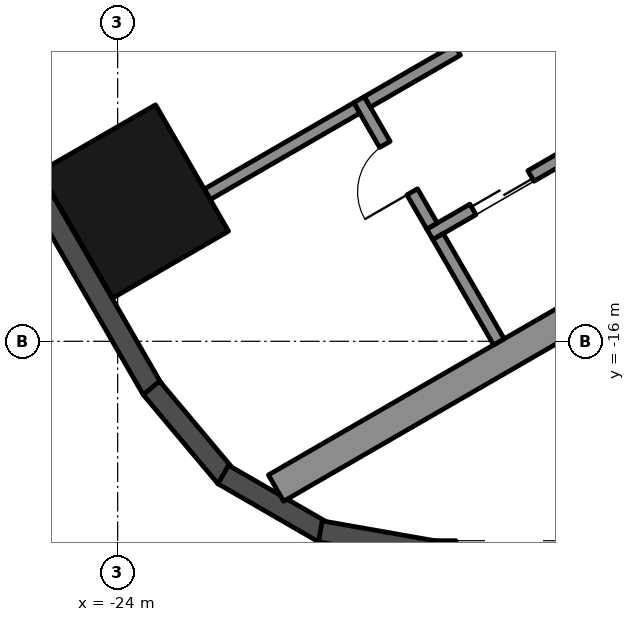
"""IFC4 building model, lengths in metres.
Left out: names, types, materials, properties, quantities, classifications, styles, units other than length and angle.
Written with IfcOpenShell. Run it as: python <this file> out.ifc"""

import sys

from ifc_helpers import new_model, si_unit, direction, frame, frame_2d, origin, origin_2d, place, context, subcontext, project, spatial, rectangle, hollow_rectangle, extrude, element, fill, save


model = new_model("IFC4")
c1 = context("Model", 3, precision=1e-05, world=origin(), true_north=direction((0.0, 1.0)))
c2 = subcontext(c1, "Body", "Model", "MODEL_VIEW")
j1 = project(units=[si_unit("LENGTHUNIT", "METRE"), si_unit("PLANEANGLEUNIT", "RADIAN")], contexts=[c1])
p1 = place(None, origin())
s1 = spatial("IfcSite", under=j1, at=p1, CompositionType="ELEMENT")
p2 = place(p1, origin())
s2 = spatial("IfcBuilding", under=s1, at=p2, CompositionType="ELEMENT")
p3 = place(p2, frame((0.0, 0.0, 191.0)))
s3 = spatial("IfcBuildingStorey", under=s2, at=p3, CompositionType="ELEMENT", Elevation=191.0)
p4 = place(p3, frame((-23.729, -13.7, 0.0), z_axis=(0.0, 0.0, 1.0), x_axis=(-0.5, 0.866025403784, 0.0)))
e1 = element("IfcColumn", 1, at=p4, inside=s3, PredefinedType="COLUMN", context=c2, shape_type="SweptSolid", body=[
    extrude(hollow_rectangle(XDim=2.4, YDim=2.2, WallThickness=0.06, at=origin_2d()), origin(), (0.0, 0.0, 1.0), 3.7),
])
p5 = place(p3, frame((-26.257, -11.893, 0.0), z_axis=(0.0, 0.0, 1.0), x_axis=(0.500018773155, -0.866014564827, 0.0)))
e2 = element("IfcWall", 2, at=p5, inside=s3, PredefinedType="SOLIDWALL", context=c2, shape_type="SweptSolid", body=[
    extrude(rectangle(XDim=5.658, YDim=0.35, at=frame_2d((2.829, 0.0))), origin(), (0.0, 0.0, 1.0), 3.55),
])
for number, where, z_axis, x_axis in (
    (3, (-23.445, -16.768, 0.0), (0.0, 0.0, 1.0), (0.643, -0.766, 0.0)),
    (4, (-22.264, -18.192, 0.0), (0.0, 0.0, 1.0), (0.866, -0.5, 0.0)),
):
    element("IfcWall", number, at=place(p3, frame(where, z_axis=z_axis, x_axis=x_axis)), inside=s3, PredefinedType="SOLIDWALL", context=c2, shape_type="SweptSolid", body=[
        extrude(rectangle(XDim=1.91, YDim=0.35, at=frame_2d((0.955, 0.0))), origin(), (0.0, 0.0, 1.0), 3.55),
    ])
p6 = place(p3, frame((-20.667, -19.126, 0.0), z_axis=(0.0, 0.0, 1.0), x_axis=(0.984798995425, -0.173697837091, 0.0)))
e5 = element("IfcWall", 5, at=p6, inside=s3, PredefinedType="SOLIDWALL", context=c2, shape_type="SweptSolid", body=[
    extrude(rectangle(XDim=1.91, YDim=0.35, at=frame_2d((0.955, 0.0))), origin(), (0.0, 0.0, 1.0), 3.55),
])
p7 = place(p3, frame((-18.816, -19.455, 0.0), z_axis=(0.0, 0.0, 1.0), x_axis=(1.0, 0.0, 0.0)))
e6 = element("IfcWall", 6, at=p7, inside=s3, PredefinedType="SOLIDWALL", context=c2, shape_type="SweptSolid", body=[
    extrude(rectangle(XDim=11.816, YDim=0.35, at=frame_2d((5.908, 0.0))), origin(), (0.0, 0.0, 1.0), 3.55),
])
p8 = place(p7, frame((0.381, 0.0, 0.3)))
e7 = element("IfcOpeningElement", 7, at=p8, cuts=e6, PredefinedType="OPENING", context=c2, shape_type="SweptSolid", body=[
    extrude(rectangle(XDim=1.9, YDim=2.65, at=frame_2d((0.95, 1.325))), frame((0.0, 0.185, 0.0), z_axis=(0.0, -1.0, 0.0), x_axis=(1.0, 0.0, 0.0)), (0.0, 0.0, 1.0), 0.37),
])
p9 = place(p7, frame((7.79, 0.0, 0.0)))
e8 = element("IfcOpeningElement", 8, at=p9, cuts=e6, PredefinedType="OPENING", context=c2, shape_type="SweptSolid", body=[
    extrude(rectangle(XDim=2.4, YDim=2.4, at=frame_2d((1.2, 1.2))), frame((0.0, 0.185, 0.0), z_axis=(0.0, -1.0, 0.0), x_axis=(1.0, 0.0, 0.0)), (0.0, 0.0, 1.0), 0.37),
])
p10 = place(p7, frame((3.741, 0.0, 0.3)))
e9 = element("IfcOpeningElement", 9, at=p10, cuts=e6, PredefinedType="OPENING", context=c2, shape_type="SweptSolid", body=[
    extrude(rectangle(XDim=1.7, YDim=2.65, at=frame_2d((0.85, 1.325))), frame((0.0, 0.185, 0.0), z_axis=(0.0, -1.0, 0.0), x_axis=(1.0, 0.0, 0.0)), (0.0, 0.0, 1.0), 0.37),
])
p11 = place(p7, frame((5.741, 0.0, 0.3)))
e10 = element("IfcOpeningElement", 10, at=p11, cuts=e6, PredefinedType="OPENING", context=c2, shape_type="SweptSolid", body=[
    extrude(rectangle(XDim=1.7, YDim=2.65, at=frame_2d((0.85, 1.325))), frame((0.0, 0.185, 0.0), z_axis=(0.0, -1.0, 0.0), x_axis=(1.0, 0.0, 0.0)), (0.0, 0.0, 1.0), 0.37),
])
p12 = place(p3, frame((-8.547, -10.997, 0.0), z_axis=(0.0, 0.0, 1.0), x_axis=(-0.866025009528, -0.500000682871, 0.0)))
e11 = element("IfcWall", 11, at=p12, inside=s3, PredefinedType="SHEAR", context=c2, shape_type="SweptSolid", body=[
    extrude(rectangle(XDim=14.837, YDim=0.5, at=frame_2d((7.418, 0.0))), origin(), (0.0, 0.0, 1.0), 3.5),
])
p13 = place(p3, frame((-10.068, -9.162, 0.0), z_axis=(0.0, 0.0, 1.0), x_axis=(-0.866032725843, -0.499987317609, 0.0)))
e12 = element("IfcWall", 12, at=p13, inside=s3, PredefinedType="SHEAR", context=c2, shape_type="SweptSolid", body=[
    extrude(rectangle(XDim=10.16, YDim=0.2, at=frame_2d((5.08, 0.0))), origin(), (0.0, 0.0, 1.0), 3.5),
])
p14 = place(p13, frame((0.62, 0.0, 0.0)))
e13 = element("IfcOpeningElement", 13, at=p14, cuts=e12, PredefinedType="OPENING", context=c2, shape_type="SweptSolid", body=[
    extrude(rectangle(XDim=1.1, YDim=2.1, at=frame_2d((0.55, 1.05))), frame((0.0, 0.11, 0.0), z_axis=(0.0, -1.0, 0.0), x_axis=(1.0, 0.0, 0.0)), (0.0, 0.0, 1.0), 0.22),
])
p15 = place(p13, frame((3.16, 0.0, 0.0)))
e14 = element("IfcOpeningElement", 14, at=p15, cuts=e12, PredefinedType="OPENING", context=c2, shape_type="SweptSolid", body=[
    extrude(rectangle(XDim=1.1, YDim=2.1, at=frame_2d((0.55, 1.05))), frame((0.0, 0.11, 0.0), z_axis=(0.0, -1.0, 0.0), x_axis=(1.0, 0.0, 0.0)), (0.0, 0.0, 1.0), 0.22),
])
p16 = place(p13, frame((5.7, 0.0, 0.0)))
e15 = element("IfcOpeningElement", 15, at=p16, cuts=e12, PredefinedType="OPENING", context=c2, shape_type="SweptSolid", body=[
    extrude(rectangle(XDim=1.1, YDim=2.1, at=frame_2d((0.55, 1.05))), frame((0.0, 0.11, 0.0), z_axis=(0.0, -1.0, 0.0), x_axis=(1.0, 0.0, 0.0)), (0.0, 0.0, 1.0), 0.22),
])
p17 = place(p13, frame((8.24, 0.0, 0.0)))
e16 = element("IfcOpeningElement", 16, at=p17, cuts=e12, PredefinedType="OPENING", context=c2, shape_type="SweptSolid", body=[
    extrude(rectangle(XDim=1.1, YDim=2.1, at=frame_2d((0.55, 1.05))), frame((0.0, 0.11, 0.0), z_axis=(0.0, -1.0, 0.0), x_axis=(1.0, 0.0, 0.0)), (0.0, 0.0, 1.0), 0.22),
])
p18 = place(p3, frame((-20.031, -12.026, 0.0), z_axis=(0.0, 0.0, 1.0), x_axis=(0.500033551112, -0.866006032174, 0.0)))
e17 = element("IfcWall", 17, at=p18, inside=s3, PredefinedType="SHEAR", context=c2, shape_type="SweptSolid", body=[
    extrude(rectangle(XDim=2.4, YDim=0.2, at=frame_2d((1.2, 0.0))), origin(), (0.0, 0.0, 1.0), 3.5),
])
p19 = place(p18, frame((0.85, 0.0, 0.0)))
e18 = element("IfcOpeningElement", 18, at=p19, cuts=e17, PredefinedType="OPENING", context=c2, shape_type="SweptSolid", body=[
    extrude(rectangle(XDim=0.9, YDim=2.1, at=frame_2d((0.45, 1.05))), frame((0.0, 0.11, 0.0), z_axis=(0.0, -1.0, 0.0), x_axis=(1.0, 0.0, 0.0)), (0.0, 0.0, 1.0), 0.22),
])
p20 = place(p3, frame((-18.413, -11.208, 0.0), z_axis=(0.0, 0.0, 1.0), x_axis=(-0.866038183914, -0.499977863513, 0.0)))
e19 = element("IfcWall", 19, at=p20, inside=s3, PredefinedType="SHEAR", context=c2, shape_type="SweptSolid", body=[
    extrude(rectangle(XDim=1.71, YDim=0.2, at=frame_2d((0.855, 0.0))), origin(), (0.0, 0.0, 1.0), 3.5),
])
p21 = place(p3, frame((-18.73, -14.278, 0.0), z_axis=(0.0, 0.0, 1.0), x_axis=(0.50002537861, -0.866010750942, 0.0)))
e20 = element("IfcWall", 20, at=p21, inside=s3, PredefinedType="SHEAR", context=c2, shape_type="SweptSolid", body=[
    extrude(rectangle(XDim=2.0, YDim=0.2, at=frame_2d((1.0, 0.0))), origin(), (0.0, 0.0, 1.0), 3.5),
])
p22 = place(p3, frame((-20.067, -12.163, 0.0), z_axis=(0.0, 0.0, 1.0), x_axis=(-0.866055327414, -0.49994816717, 0.0)))
e21 = element("IfcWall", 21, at=p22, inside=s3, PredefinedType="SHEAR", context=c2, shape_type="SweptSolid", body=[
    extrude(rectangle(XDim=2.84, YDim=0.2, at=frame_2d((1.42, 0.0))), origin(), (0.0, 0.0, 1.0), 3.5),
])
p23 = place(p17, origin())
e22 = element("IfcDoor", 22, at=p23, inside=s3, OperationType="DOUBLE_DOOR_SLIDING", PredefinedType="DOOR", context=c2, shape_type="SweptSolid", body=[
    extrude(rectangle(XDim=1.1, YDim=2.1, at=frame_2d((0.55, 1.05))), frame((0.0, 0.025, 0.0), z_axis=(0.0, -1.0, 0.0), x_axis=(1.0, 0.0, 0.0)), (0.0, 0.0, 1.0), 0.05),
])
fill(e16, e22)
p24 = place(p19, frame((0.9, 0.0, 0.0), z_axis=(0.0, 0.0, 1.0), x_axis=(-1.0, 0.0, 0.0)))
e23 = element("IfcDoor", 23, at=p24, inside=s3, OperationType="SINGLE_SWING_LEFT", PredefinedType="DOOR", context=c2, shape_type="SweptSolid", body=[
    extrude(rectangle(XDim=0.9, YDim=2.1, at=frame_2d((0.45, 1.05))), frame((0.0, 0.025, 0.0), z_axis=(0.0, -1.0, 0.0), x_axis=(1.0, 0.0, 0.0)), (0.0, 0.0, 1.0), 0.05),
])
fill(e18, e23)
save(model, sys.argv[1])
